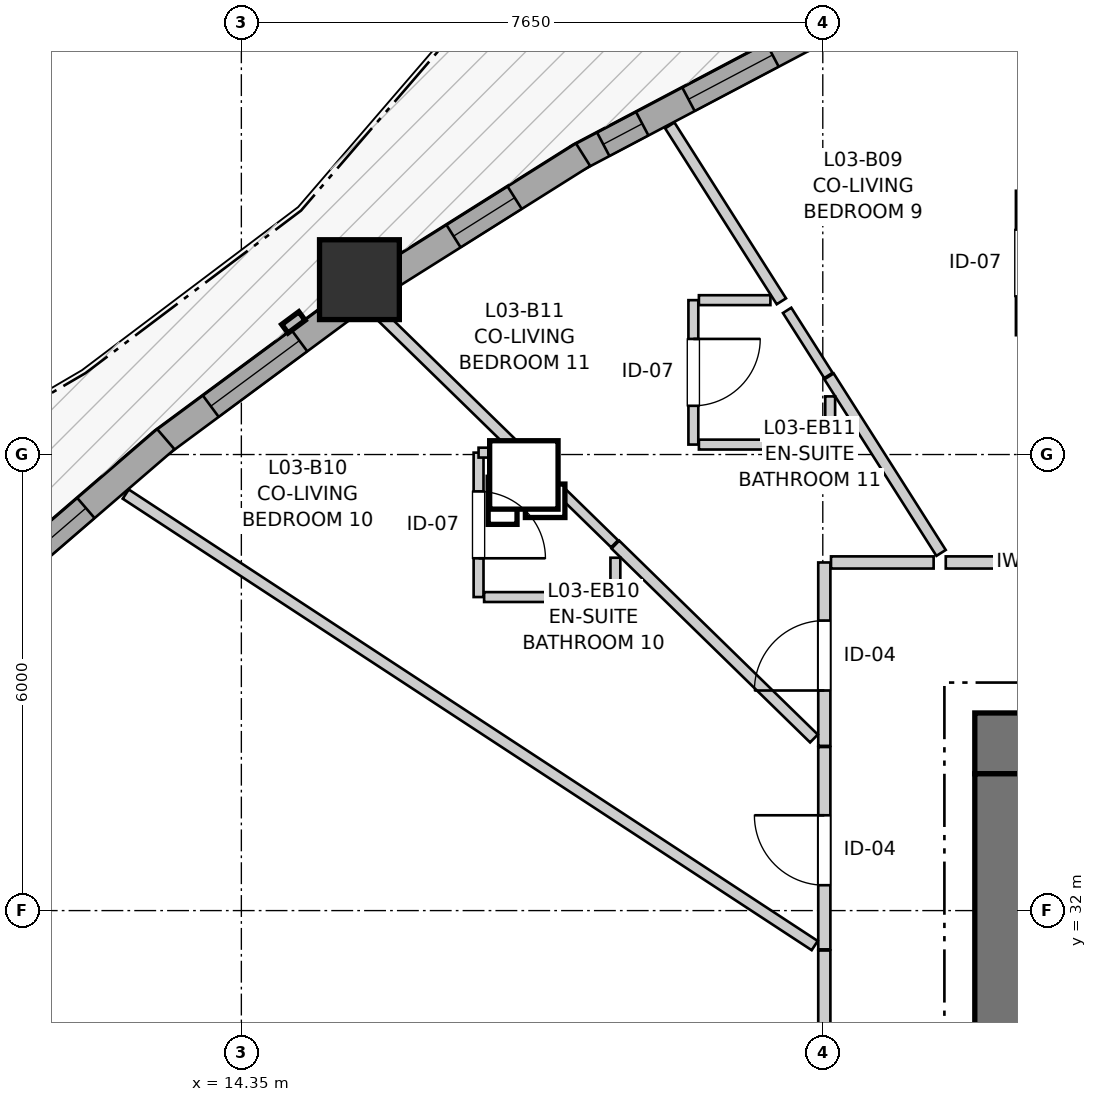
"""IFC4 building model, lengths in metres.
Left out: names, types, materials, properties, quantities, classifications, styles, units other than length and angle.
Written with IfcOpenShell. Run it as: python <this file> out.ifc"""

import sys

from ifc_helpers import new_model, si_unit, direction, frame, frame_2d, origin, origin_2d, place, context, subcontext, project, spatial, rectangle, extrude, source, transform, mapped, element, fill, save


model = new_model("IFC4")
c1 = context("Model", 3, precision=1e-05, world=origin(), true_north=direction((0.0, 1.0)))
c2 = subcontext(c1, "Body", "Model", "MODEL_VIEW")
j1 = project(units=[si_unit("LENGTHUNIT", "METRE"), si_unit("PLANEANGLEUNIT", "RADIAN")], contexts=[c1])
p1 = place(None, origin())
s1 = spatial("IfcSite", under=j1, at=p1, CompositionType="ELEMENT")
p2 = place(p1, origin())
s2 = spatial("IfcBuilding", under=s1, at=p2, CompositionType="ELEMENT")
p3 = place(p2, frame((0.0, 0.0, 14.2)))
s3 = spatial("IfcBuildingStorey", under=s2, at=p3, CompositionType="ELEMENT", Elevation=14.2)
p4 = place(p3, frame((36.7, 34.2, 0.0), z_axis=(0.0, 0.0, 1.0), x_axis=(-1.0, 0.0, 0.0)))
e1 = element("IfcWall", 1, at=p4, inside=s3, PredefinedType="SHEAR", context=c2, shape_type="SweptSolid", body=[
    extrude(rectangle(XDim=12.7, YDim=0.8, at=frame_2d((6.35, 0.0))), origin(), (0.0, 0.0, 1.0), 2.94),
])
p5 = place(p3, frame((24.4, 33.8, 0.0), z_axis=(0.0, 0.0, 1.0), x_axis=(0.0, -1.0, 0.0)))
e2 = element("IfcWall", 2, at=p5, inside=s3, PredefinedType="SHEAR", context=c2, shape_type="SweptSolid", body=[
    extrude(rectangle(XDim=15.6, YDim=0.8, at=frame_2d((7.8, 0.0))), origin(), (0.0, 0.0, 1.0), 2.94),
])
p6 = place(p5, frame((7.05, 0.0, 0.0)))
e3 = element("IfcOpeningElement", 3, at=p6, cuts=e2, PredefinedType="OPENING", context=c2, shape_type="SweptSolid", body=[
    extrude(rectangle(XDim=1.5, YDim=2.15, at=frame_2d((0.75, 1.075))), frame((0.0, 0.41, 0.0), z_axis=(0.0, -1.0, 0.0), x_axis=(1.0, 0.0, 0.0)), (0.0, 0.0, 1.0), 0.82),
])
p7 = place(p5, frame((3.52, 0.0, 0.0)))
e4 = element("IfcOpeningElement", 4, at=p7, cuts=e2, PredefinedType="OPENING", context=c2, shape_type="SweptSolid", body=[
    extrude(rectangle(XDim=0.86, YDim=2.05, at=frame_2d((0.43, 1.025))), frame((0.0, 0.41, 0.0), z_axis=(0.0, -1.0, 0.0), x_axis=(1.0, 0.0, 0.0)), (0.0, 0.0, 1.0), 0.82),
])
p8 = place(p5, frame((11.22, 0.0, 0.0)))
e5 = element("IfcOpeningElement", 5, at=p8, cuts=e2, PredefinedType="OPENING", context=c2, shape_type="SweptSolid", body=[
    extrude(rectangle(XDim=0.86, YDim=2.05, at=frame_2d((0.43, 1.025))), frame((0.0, 0.41, 0.0), z_axis=(0.0, -1.0, 0.0), x_axis=(1.0, 0.0, 0.0)), (0.0, 0.0, 1.0), 0.82),
])
m1 = source(origin(), c2, "Body", "SweptSolid", [
    extrude(rectangle(XDim=1.05, YDim=1.05, at=origin_2d()), origin(), (0.0, 0.0, 1.0), 2.94),
])
p9 = place(p3, frame((15.904, 40.301, 0.0), z_axis=(0.0, 0.0, 1.0), x_axis=(1.0, 0.0, 0.0)))
e6 = element("IfcColumn", 6, at=p9, inside=s3, PredefinedType="COLUMN", context=c2, shape_type="MappedRepresentation", body=[
    mapped(m1, transform((0.0, 0.0, 0.0), x_axis=(1.0, 0.0, 0.0), y_axis=(0.0, 1.0, 0.0), z_axis=(0.0, 0.0, 1.0), scale=1.0)),
])
p10 = place(p3, frame((21.728, 43.462, 0.0), z_axis=(0.0, 0.0, 1.0), x_axis=(-0.884404833282, -0.466720570435, 0.0)))
e7 = element("IfcWall", 7, at=p10, inside=s3, PredefinedType="SOLIDWALL", context=c2, shape_type="SweptSolid", body=[
    extrude(rectangle(XDim=3.346, YDim=0.35, at=frame_2d((1.673, 0.0))), origin(), (0.0, 0.0, 1.0), 2.42),
])
p11 = place(p10, frame((0.44, 0.0, 0.82)))
e8 = element("IfcOpeningElement", 8, at=p11, cuts=e7, PredefinedType="OPENING", context=c2, shape_type="SweptSolid", body=[
    extrude(rectangle(XDim=1.25, YDim=1.35, at=frame_2d((0.625, 0.675))), frame((0.0, 0.185, 0.0), z_axis=(0.0, -1.0, 0.0), x_axis=(1.0, 0.0, 0.0)), (0.0, 0.0, 1.0), 0.37),
])
p12 = place(p10, frame((2.378, 0.0, 0.82)))
e9 = element("IfcOpeningElement", 9, at=p12, cuts=e7, PredefinedType="OPENING", context=c2, shape_type="SweptSolid", body=[
    extrude(rectangle(XDim=0.58, YDim=1.35, at=frame_2d((0.29, 0.675))), frame((0.0, 0.185, 0.0), z_axis=(0.0, -1.0, 0.0), x_axis=(1.0, 0.0, 0.0)), (0.0, 0.0, 1.0), 0.37),
])
p13 = place(p3, frame((18.846, 41.945, 0.0), z_axis=(0.0, 0.0, 1.0), x_axis=(-0.846424281274, -0.532509094824, 0.0)))
e10 = element("IfcWall", 10, at=p13, inside=s3, PredefinedType="SOLIDWALL", context=c2, shape_type="SweptSolid", body=[
    extrude(rectangle(XDim=3.066, YDim=0.35, at=frame_2d((1.533, 0.0))), origin(), (0.0, 0.0, 1.0), 2.42),
])
p14 = place(p13, frame((1.063, 0.0, 0.82)))
e11 = element("IfcOpeningElement", 11, at=p14, cuts=e10, PredefinedType="OPENING", context=c2, shape_type="SweptSolid", body=[
    extrude(rectangle(XDim=0.95, YDim=1.35, at=frame_2d((0.475, 0.675))), frame((0.0, 0.185, 0.0), z_axis=(0.0, -1.0, 0.0), x_axis=(1.0, 0.0, 0.0)), (0.0, 0.0, 1.0), 0.37),
])
p15 = place(p3, frame((15.767, 39.981, 0.0), z_axis=(0.0, 0.0, 1.0), x_axis=(-0.803838872114, -0.59484709605, 0.0)))
e12 = element("IfcWall", 12, at=p15, inside=s3, PredefinedType="SOLIDWALL", context=c2, shape_type="SweptSolid", body=[
    extrude(rectangle(XDim=3.085, YDim=0.35, at=frame_2d((1.542, 0.0))), origin(), (0.0, 0.0, 1.0), 2.42),
])
p16 = place(p15, frame((0.812, 0.0, 0.82)))
e13 = element("IfcOpeningElement", 13, at=p16, cuts=e12, PredefinedType="OPENING", context=c2, shape_type="SweptSolid", body=[
    extrude(rectangle(XDim=1.45, YDim=1.25, at=frame_2d((0.725, 0.625))), frame((0.0, 0.185, 0.0), z_axis=(0.0, -1.0, 0.0), x_axis=(1.0, 0.0, 0.0)), (0.0, 0.0, 1.0), 0.37),
])
p17 = place(p3, frame((13.356, 38.202, 0.0), z_axis=(0.0, 0.0, 1.0), x_axis=(-0.757466232343, -0.65287434232, 0.0)))
e14 = element("IfcWall", 14, at=p17, inside=s3, PredefinedType="SOLIDWALL", context=c2, shape_type="SweptSolid", body=[
    extrude(rectangle(XDim=3.403, YDim=0.35, at=frame_2d((1.702, 0.0))), origin(), (0.0, 0.0, 1.0), 2.42),
])
p18 = place(p17, frame((1.388, 0.0, 0.82)))
e15 = element("IfcOpeningElement", 15, at=p18, cuts=e14, PredefinedType="OPENING", context=c2, shape_type="SweptSolid", body=[
    extrude(rectangle(XDim=1.45, YDim=1.25, at=frame_2d((0.725, 0.625))), frame((0.0, 0.185, 0.0), z_axis=(0.0, -1.0, 0.0), x_axis=(1.0, 0.0, 0.0)), (0.0, 0.0, 1.0), 0.37),
])
p19 = place(p3, frame((23.618, 36.58, 0.0), z_axis=(0.0, 0.0, 1.0), x_axis=(1.0, 0.0, 0.0)))
e16 = element("IfcWall", 16, at=p19, inside=s3, PredefinedType="PARTITIONING", context=c2, shape_type="SweptSolid", body=[
    extrude(rectangle(XDim=4.123, YDim=0.16, at=frame_2d((2.062, 0.0))), origin(), (0.0, 0.0, 1.0), 2.548),
])
p20 = place(p19, frame((1.603, 0.0, 0.0)))
e17 = element("IfcOpeningElement", 17, at=p20, cuts=e16, PredefinedType="OPENING", context=c2, shape_type="SweptSolid", body=[
    extrude(rectangle(XDim=0.92, YDim=2.1, at=frame_2d((0.46, 1.05))), frame((0.0, 0.09, 0.0), z_axis=(0.0, -1.0, 0.0), x_axis=(1.0, 0.0, 0.0)), (0.0, 0.0, 1.0), 0.18),
])
p21 = place(p3, frame((22.02, 27.85, 0.0), z_axis=(0.0, 0.0, 1.0), x_axis=(0.0, 1.0, 0.0)))
e18 = element("IfcWall", 18, at=p21, inside=s3, PredefinedType="PARTITIONING", context=c2, shape_type="SweptSolid", body=[
    extrude(rectangle(XDim=3.625, YDim=0.16, at=frame_2d((1.812, 0.0))), origin(), (0.0, 0.0, 1.0), 2.94),
])
p22 = place(p21, frame((1.353, 0.0, 0.0)))
e19 = element("IfcOpeningElement", 19, at=p22, cuts=e18, PredefinedType="OPENING", context=c2, shape_type="SweptSolid", body=[
    extrude(rectangle(XDim=0.96, YDim=2.1, at=frame_2d((0.48, 1.05))), frame((0.0, 0.09, 0.0), z_axis=(0.0, -1.0, 0.0), x_axis=(1.0, 0.0, 0.0)), (0.0, 0.0, 1.0), 0.18),
])
p23 = place(p3, frame((22.02, 31.49, 0.0), z_axis=(0.0, 0.0, 1.0), x_axis=(0.0, 1.0, 0.0)))
e20 = element("IfcWall", 20, at=p23, inside=s3, PredefinedType="PARTITIONING", context=c2, shape_type="SweptSolid", body=[
    extrude(rectangle(XDim=2.662, YDim=0.16, at=frame_2d((1.331, 0.0))), origin(), (0.0, 0.0, 1.0), 2.94),
])
p24 = place(p23, frame((0.844, 0.0, 0.0)))
e21 = element("IfcOpeningElement", 21, at=p24, cuts=e20, PredefinedType="OPENING", context=c2, shape_type="SweptSolid", body=[
    extrude(rectangle(XDim=0.92, YDim=2.1, at=frame_2d((0.46, 1.05))), frame((0.0, 0.09, 0.0), z_axis=(0.0, -1.0, 0.0), x_axis=(1.0, 0.0, 0.0)), (0.0, 0.0, 1.0), 0.18),
])
p25 = place(p3, frame((22.02, 34.167, 0.0), z_axis=(0.0, 0.0, 1.0), x_axis=(0.0, 1.0, 0.0)))
e22 = element("IfcWall", 22, at=p25, inside=s3, PredefinedType="PARTITIONING", context=c2, shape_type="SweptSolid", body=[
    extrude(rectangle(XDim=2.413, YDim=0.16, at=frame_2d((1.207, 0.0))), origin(), (0.0, 0.0, 1.0), 2.94),
])
p26 = place(p25, frame((0.729, 0.0, 0.0)))
e23 = element("IfcOpeningElement", 23, at=p26, cuts=e22, PredefinedType="OPENING", context=c2, shape_type="SweptSolid", body=[
    extrude(rectangle(XDim=0.92, YDim=2.1, at=frame_2d((0.46, 1.05))), frame((0.0, 0.09, 0.0), z_axis=(0.0, -1.0, 0.0), x_axis=(1.0, 0.0, 0.0)), (0.0, 0.0, 1.0), 0.18),
])
p27 = place(p3, frame((24.606, 41.47, 0.0), z_axis=(0.0, 0.0, 1.0), x_axis=(0.0, -1.0, 0.0)))
e24 = element("IfcWall", 24, at=p27, inside=s3, PredefinedType="PARTITIONING", context=c2, shape_type="SweptSolid", body=[
    extrude(rectangle(XDim=1.9, YDim=0.13, at=frame_2d((0.95, 0.0))), origin(), (0.0, 0.0, 1.0), 2.94),
])
p28 = place(p27, frame((0.51, 0.0, 0.0)))
e25 = element("IfcOpeningElement", 25, at=p28, cuts=e24, PredefinedType="OPENING", context=c2, shape_type="SweptSolid", body=[
    extrude(rectangle(XDim=0.88, YDim=2.05, at=frame_2d((0.44, 1.025))), frame((0.0, 0.075, 0.0), z_axis=(0.0, -1.0, 0.0), x_axis=(1.0, 0.0, 0.0)), (0.0, 0.0, 1.0), 0.15),
])
p29 = place(p3, frame((17.471, 38.025, 0.0), z_axis=(0.0, 0.0, 1.0), x_axis=(0.0, -1.0, 0.0)))
e26 = element("IfcWall", 26, at=p29, inside=s3, PredefinedType="PARTITIONING", context=c2, shape_type="SweptSolid", body=[
    extrude(rectangle(XDim=1.9, YDim=0.13, at=frame_2d((0.95, 0.0))), origin(), (0.0, 0.0, 1.0), 2.94),
])
p30 = place(p29, frame((0.51, 0.0, 0.0)))
e27 = element("IfcOpeningElement", 27, at=p30, cuts=e26, PredefinedType="OPENING", context=c2, shape_type="SweptSolid", body=[
    extrude(rectangle(XDim=0.88, YDim=2.05, at=frame_2d((0.44, 1.025))), frame((0.0, 0.075, 0.0), z_axis=(0.0, -1.0, 0.0), x_axis=(1.0, 0.0, 0.0)), (0.0, 0.0, 1.0), 0.15),
])
p31 = place(p3, frame((20.297, 40.031, 0.0), z_axis=(0.0, 0.0, 1.0), x_axis=(0.0, -1.0, 0.0)))
e28 = element("IfcWall", 28, at=p31, inside=s3, PredefinedType="PARTITIONING", context=c2, shape_type="SweptSolid", body=[
    extrude(rectangle(XDim=1.9, YDim=0.13, at=frame_2d((0.95, 0.0))), origin(), (0.0, 0.0, 1.0), 2.94),
])
p32 = place(p31, frame((0.51, 0.0, 0.0)))
e29 = element("IfcOpeningElement", 29, at=p32, cuts=e28, PredefinedType="OPENING", context=c2, shape_type="SweptSolid", body=[
    extrude(rectangle(XDim=0.88, YDim=2.05, at=frame_2d((0.44, 1.025))), frame((0.0, 0.075, 0.0), z_axis=(0.0, -1.0, 0.0), x_axis=(1.0, 0.0, 0.0)), (0.0, 0.0, 1.0), 0.15),
])
p33 = place(p3, frame((12.829, 37.479, 0.0), z_axis=(0.0, 0.0, 1.0), x_axis=(0.836435846472, -0.548064845376, 0.0)))
e30 = element("IfcWall", 30, at=p33, inside=s3, PredefinedType="PARTITIONING", context=c2, shape_type="SweptSolid", body=[
    extrude(rectangle(XDim=10.838, YDim=0.145, at=frame_2d((5.419, 0.0))), origin(), (0.0, 0.0, 1.0), 2.94),
])
p34 = place(p3, frame((19.271, 36.815, 0.0), z_axis=(0.0, 0.0, 1.0), x_axis=(0.71551452036, -0.698597860828, 0.0)))
e31 = element("IfcWall", 31, at=p34, inside=s3, PredefinedType="PARTITIONING", context=c2, shape_type="SweptSolid", body=[
    extrude(rectangle(XDim=3.651, YDim=0.145, at=frame_2d((1.826, 0.0))), origin(), (0.0, 0.0, 1.0), 2.308),
])
p35 = place(p3, frame((22.082, 39.028, 0.0), z_axis=(0.0, 0.0, 1.0), x_axis=(0.535944885386, -0.844252971465, 0.0)))
e32 = element("IfcWall", 32, at=p35, inside=s3, PredefinedType="PARTITIONING", context=c2, shape_type="SweptSolid", body=[
    extrude(rectangle(XDim=2.751, YDim=0.145, at=frame_2d((1.375, 0.0))), origin(), (0.0, 0.0, 1.0), 2.94),
])
p36 = place(p3, frame((16.034, 39.974, 0.0), z_axis=(0.0, 0.0, 1.0), x_axis=(0.715628345471, -0.69848126042, 0.0)))
e33 = element("IfcWall", 33, at=p36, inside=s3, PredefinedType="PARTITIONING", context=c2, shape_type="SweptSolid", body=[
    extrude(rectangle(XDim=2.791, YDim=0.145, at=frame_2d((1.396, 0.0))), origin(), (0.0, 0.0, 1.0), 2.308),
])
p37 = place(p3, frame((19.987, 42.33, 0.0), z_axis=(0.0, 0.0, 1.0), x_axis=(0.535808561115, -0.844339496788, 0.0)))
e34 = element("IfcWall", 34, at=p37, inside=s3, PredefinedType="PARTITIONING", context=c2, shape_type="SweptSolid", body=[
    extrude(rectangle(XDim=2.74, YDim=0.145, at=frame_2d((1.37, 0.0))), origin(), (0.0, 0.0, 1.0), 2.94),
])
p38 = place(p3, frame((17.544, 36.125, 0.0), z_axis=(0.0, 0.0, 1.0), x_axis=(1.0, 0.0, 0.0)))
e35 = element("IfcWall", 35, at=p38, inside=s3, PredefinedType="PARTITIONING", context=c2, shape_type="SweptSolid", body=[
    extrude(rectangle(XDim=1.727, YDim=0.13, at=frame_2d((0.864, 0.0))), origin(), (0.0, 0.0, 1.0), 2.94),
])
p39 = place(p3, frame((20.37, 38.131, 0.0), z_axis=(0.0, 0.0, 1.0), x_axis=(1.0, 0.0, 0.0)))
e36 = element("IfcWall", 36, at=p39, inside=s3, PredefinedType="PARTITIONING", context=c2, shape_type="SweptSolid", body=[
    extrude(rectangle(XDim=1.727, YDim=0.13, at=frame_2d((0.863, 0.0))), origin(), (0.0, 0.0, 1.0), 2.94),
])
p40 = place(p3, frame((18.042, 38.014, 0.0), z_axis=(0.0, 0.0, 1.0), x_axis=(0.715729497461, -0.698377610225, 0.0)))
e37 = element("IfcWall", 37, at=p40, inside=s3, PredefinedType="PARTITIONING", context=c2, shape_type="SweptSolid", body=[
    extrude(rectangle(XDim=1.702, YDim=0.13, at=frame_2d((0.851, 0.0))), origin(), (0.0, 0.0, 1.0), 2.308),
])
p41 = place(p3, frame((22.108, 36.58, 0.0), z_axis=(0.0, 0.0, 1.0), x_axis=(1.0, 0.0, 0.0)))
e38 = element("IfcWall", 38, at=p41, inside=s3, PredefinedType="PARTITIONING", context=c2, shape_type="SweptSolid", body=[
    extrude(rectangle(XDim=1.35, YDim=0.16, at=frame_2d((0.675, 0.0))), origin(), (0.0, 0.0, 1.0), 2.94),
])
p42 = place(p3, frame((20.37, 40.031, 0.0), z_axis=(0.0, 0.0, 1.0), x_axis=(1.0, 0.0, 0.0)))
e39 = element("IfcWall", 39, at=p42, inside=s3, PredefinedType="PARTITIONING", context=c2, shape_type="SweptSolid", body=[
    extrude(rectangle(XDim=0.941, YDim=0.13, at=frame_2d((0.47, 0.0))), origin(), (0.0, 0.0, 1.0), 2.94),
])
p43 = place(p3, frame((21.531, 39.897, 0.0), z_axis=(0.0, 0.0, 1.0), x_axis=(0.536002688679, -0.844216274262, 0.0)))
e40 = element("IfcWall", 40, at=p43, inside=s3, PredefinedType="PARTITIONING", context=c2, shape_type="SweptSolid", body=[
    extrude(rectangle(XDim=1.014, YDim=0.13, at=frame_2d((0.507, 0.0))), origin(), (0.0, 0.0, 1.0), 2.94),
])
p44 = place(p3, frame((22.097, 38.204, 0.0), z_axis=(0.0, 0.0, 1.0), x_axis=(0.0, 1.0, 0.0)))
e41 = element("IfcWall", 41, at=p44, inside=s3, PredefinedType="PARTITIONING", context=c2, shape_type="SweptSolid", body=[
    extrude(rectangle(XDim=0.561, YDim=0.13, at=frame_2d((0.28, 0.0))), origin(), (0.0, 0.0, 1.0), 2.94),
])
p45 = place(p3, frame((19.271, 36.198, 0.0), z_axis=(0.0, 0.0, 1.0), x_axis=(0.0, 1.0, 0.0)))
e42 = element("IfcWall", 42, at=p45, inside=s3, PredefinedType="PARTITIONING", context=c2, shape_type="SweptSolid", body=[
    extrude(rectangle(XDim=0.444, YDim=0.13, at=frame_2d((0.222, 0.0))), origin(), (0.0, 0.0, 1.0), 2.94),
])
p46 = place(p3, frame((17.471, 38.025, 0.0), z_axis=(0.0, 0.0, 1.0), x_axis=(1.0, 0.0, 0.0)))
e43 = element("IfcWall", 43, at=p46, inside=s3, PredefinedType="PARTITIONING", context=c2, shape_type="SweptSolid", body=[
    extrude(rectangle(XDim=0.47, YDim=0.13, at=frame_2d((0.235, 0.0))), origin(), (0.0, 0.0, 1.0), 2.94),
])
m2 = source(origin(), c2, "Body", "SweptSolid", [
    extrude(rectangle(XDim=1.25, YDim=1.35, at=frame_2d((0.625, 0.675))), frame((0.0, 0.03, 0.0), z_axis=(0.0, -1.0, 0.0), x_axis=(1.0, 0.0, 0.0)), (0.0, 0.0, 1.0), 0.06),
])
p47 = place(p11, origin())
e44 = element("IfcWindow", 44, at=p47, inside=s3, PartitioningType="SINGLE_PANEL", PredefinedType="WINDOW", context=c2, shape_type="MappedRepresentation", body=[
    mapped(m2, transform((0.0, 0.0, 0.0), x_axis=(1.0, 0.0, 0.0), y_axis=(0.0, 1.0, 0.0), z_axis=(0.0, 0.0, 1.0), scale=1.0)),
])
fill(e8, e44)
m3 = source(origin(), c2, "Body", "SweptSolid", [
    extrude(rectangle(XDim=0.58, YDim=1.35, at=frame_2d((0.29, 0.675))), frame((0.0, 0.03, 0.0), z_axis=(0.0, -1.0, 0.0), x_axis=(1.0, 0.0, 0.0)), (0.0, 0.0, 1.0), 0.06),
])
p48 = place(p12, origin())
e45 = element("IfcWindow", 45, at=p48, inside=s3, PartitioningType="SINGLE_PANEL", PredefinedType="WINDOW", context=c2, shape_type="MappedRepresentation", body=[
    mapped(m3, transform((0.0, 0.0, 0.0), x_axis=(1.0, 0.0, 0.0), y_axis=(0.0, 1.0, 0.0), z_axis=(0.0, 0.0, 1.0), scale=1.0)),
])
fill(e9, e45)
m4 = source(origin(), c2, "Body", "SweptSolid", [
    extrude(rectangle(XDim=0.95, YDim=1.35, at=frame_2d((0.475, 0.675))), frame((0.0, 0.03, 0.0), z_axis=(0.0, -1.0, 0.0), x_axis=(1.0, 0.0, 0.0)), (0.0, 0.0, 1.0), 0.06),
])
p49 = place(p14, origin())
e46 = element("IfcWindow", 46, at=p49, inside=s3, PartitioningType="SINGLE_PANEL", PredefinedType="WINDOW", context=c2, shape_type="MappedRepresentation", body=[
    mapped(m4, transform((0.0, 0.0, 0.0), x_axis=(1.0, 0.0, 0.0), y_axis=(0.0, 1.0, 0.0), z_axis=(0.0, 0.0, 1.0), scale=1.0)),
])
fill(e11, e46)
m5 = source(origin(), c2, "Body", "SweptSolid", [
    extrude(rectangle(XDim=1.45, YDim=1.25, at=frame_2d((0.725, 0.625))), frame((0.0, 0.03, 0.0), z_axis=(0.0, -1.0, 0.0), x_axis=(1.0, 0.0, 0.0)), (0.0, 0.0, 1.0), 0.06),
])
p50 = place(p16, origin())
e47 = element("IfcWindow", 47, at=p50, inside=s3, PartitioningType="SINGLE_PANEL", PredefinedType="WINDOW", context=c2, shape_type="MappedRepresentation", body=[
    mapped(m5, transform((0.0, 0.0, 0.0), x_axis=(1.0, 0.0, 0.0), y_axis=(0.0, 1.0, 0.0), z_axis=(0.0, 0.0, 1.0), scale=1.0)),
])
fill(e13, e47)
p51 = place(p18, origin())
e48 = element("IfcWindow", 48, at=p51, inside=s3, PartitioningType="SINGLE_PANEL", PredefinedType="WINDOW", context=c2, shape_type="MappedRepresentation", body=[
    mapped(m5, transform((0.0, 0.0, 0.0), x_axis=(1.0, 0.0, 0.0), y_axis=(0.0, 1.0, 0.0), z_axis=(0.0, 0.0, 1.0), scale=1.0)),
])
fill(e15, e48)
m6 = source(origin(), c2, "Body", "SweptSolid", [
    extrude(rectangle(XDim=0.92, YDim=2.1, at=frame_2d((0.46, 1.05))), frame((0.0, 0.025, 0.0), z_axis=(0.0, -1.0, 0.0), x_axis=(1.0, 0.0, 0.0)), (0.0, 0.0, 1.0), 0.05),
])
p52 = place(p24, origin())
e49 = element("IfcDoor", 49, at=p52, inside=s3, OperationType="SINGLE_SWING_RIGHT", PredefinedType="DOOR", context=c2, shape_type="MappedRepresentation", body=[
    mapped(m6, transform((0.0, 0.0, 0.0), x_axis=(1.0, 0.0, 0.0), y_axis=(0.0, 1.0, 0.0), z_axis=(0.0, 0.0, 1.0), scale=1.0)),
])
fill(e21, e49)
p53 = place(p26, origin())
e50 = element("IfcDoor", 50, at=p53, inside=s3, OperationType="SINGLE_SWING_LEFT", PredefinedType="DOOR", context=c2, shape_type="MappedRepresentation", body=[
    mapped(m6, transform((0.0, 0.0, 0.0), x_axis=(1.0, 0.0, 0.0), y_axis=(0.0, 1.0, 0.0), z_axis=(0.0, 0.0, 1.0), scale=1.0)),
])
fill(e23, e50)
m7 = source(origin(), c2, "Body", "SweptSolid", [
    extrude(rectangle(XDim=0.88, YDim=2.05, at=frame_2d((0.44, 1.025))), frame((0.0, 0.025, 0.0), z_axis=(0.0, -1.0, 0.0), x_axis=(1.0, 0.0, 0.0)), (0.0, 0.0, 1.0), 0.05),
])
p54 = place(p30, origin())
e51 = element("IfcDoor", 51, at=p54, inside=s3, OperationType="SINGLE_SWING_RIGHT", PredefinedType="DOOR", context=c2, shape_type="MappedRepresentation", body=[
    mapped(m7, transform((0.0, 0.0, 0.0), x_axis=(1.0, 0.0, 0.0), y_axis=(0.0, 1.0, 0.0), z_axis=(0.0, 0.0, 1.0), scale=1.0)),
])
fill(e27, e51)
p55 = place(p32, origin())
e52 = element("IfcDoor", 52, at=p55, inside=s3, OperationType="SINGLE_SWING_LEFT", PredefinedType="DOOR", context=c2, shape_type="MappedRepresentation", body=[
    mapped(m7, transform((0.0, 0.0, 0.0), x_axis=(1.0, 0.0, 0.0), y_axis=(0.0, 1.0, 0.0), z_axis=(0.0, 0.0, 1.0), scale=1.0)),
])
fill(e29, e52)
save(model, sys.argv[1])
